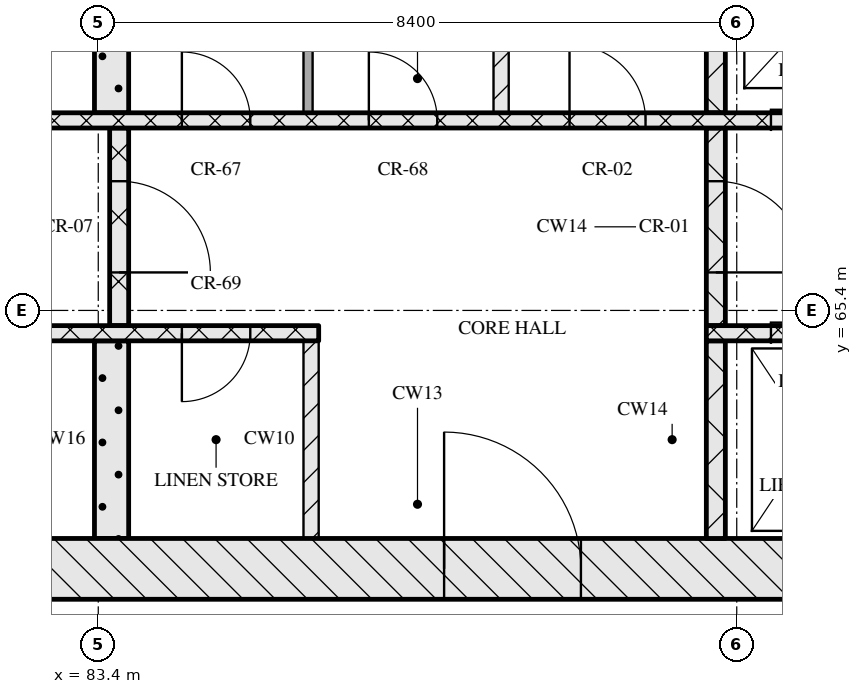
"""IFC4 building model, lengths in metres.
Left out: names, types, materials, properties, quantities, classifications, styles, units other than length and angle.
Written with IfcOpenShell. Run it as: python <this file> out.ifc"""

import sys

from ifc_helpers import new_model, si_unit, direction, frame, frame_2d, origin, place, context, subcontext, project, spatial, rectangle, extrude, element, fill, save


model = new_model("IFC4")
c1 = context("Model", 3, precision=1e-05, world=origin(), true_north=direction((0.0, 1.0)))
c2 = subcontext(c1, "Body", "Model", "MODEL_VIEW")
j1 = project(units=[si_unit("LENGTHUNIT", "METRE"), si_unit("PLANEANGLEUNIT", "RADIAN")], contexts=[c1])
p1 = place(None, origin())
s1 = spatial("IfcSite", under=j1, at=p1, CompositionType="ELEMENT")
p2 = place(p1, origin())
s2 = spatial("IfcBuilding", under=s1, at=p2, CompositionType="ELEMENT")
p3 = place(p2, frame((0.0, 0.0, 179.85)))
s3 = spatial("IfcBuildingStorey", under=s2, at=p3, CompositionType="ELEMENT", Elevation=179.85)
p4 = place(p3, frame((67.0, 62.0, 0.0), z_axis=(0.0, 0.0, 1.0), x_axis=(1.0, 0.0, 0.0)))
e1 = element("IfcWall", 1, at=p4, inside=s3, PredefinedType="SOLIDWALL", context=c2, shape_type="SweptSolid", body=[
    extrude(rectangle(XDim=41.2, YDim=0.8, at=frame_2d((20.6, 0.0))), origin(), (0.0, 0.0, 1.0), 3.32),
])
p5 = place(p4, frame((20.95, 0.0, 0.0)))
e2 = element("IfcOpeningElement", 2, at=p5, cuts=e1, PredefinedType="OPENING", context=c2, shape_type="SweptSolid", body=[
    extrude(rectangle(XDim=1.8, YDim=2.1, at=frame_2d((0.9, 1.05))), frame((0.0, 0.41, 0.0), z_axis=(0.0, -1.0, 0.0), x_axis=(1.0, 0.0, 0.0)), (0.0, 0.0, 1.0), 0.82),
])
p6 = place(p3, frame((83.575, 62.4, 0.0), z_axis=(0.0, 0.0, 1.0), x_axis=(0.0, 1.0, 0.0)))
e3 = element("IfcWall", 3, at=p6, inside=s3, PredefinedType="SOLIDWALL", context=c2, shape_type="SweptSolid", body=[
    extrude(rectangle(XDim=2.6, YDim=0.45, at=frame_2d((1.3, 0.0))), origin(), (0.0, 0.0, 1.0), 3.32),
])
p7 = place(p3, frame((86.2, 62.4, 0.0), z_axis=(0.0, 0.0, 1.0), x_axis=(0.0, 1.0, 0.0)))
e4 = element("IfcWall", 4, at=p7, inside=s3, PredefinedType="PARTITIONING", context=c2, shape_type="SweptSolid", body=[
    extrude(rectangle(XDim=2.6, YDim=0.2, at=frame_2d((1.3, 0.0))), origin(), (0.0, 0.0, 1.0), 3.32),
])
p8 = place(p3, frame((91.525, 62.4, 0.0), z_axis=(0.0, 0.0, 1.0), x_axis=(0.0, 1.0, 0.0)))
e5 = element("IfcWall", 5, at=p8, inside=s3, PredefinedType="SOLIDWALL", context=c2, shape_type="SweptSolid", body=[
    extrude(rectangle(XDim=2.6, YDim=0.25, at=frame_2d((1.3, 0.0))), origin(), (0.0, 0.0, 1.0), 3.32),
])
p9 = place(p3, frame((67.8, 65.1, 0.0), z_axis=(0.0, 0.0, 1.0), x_axis=(1.0, 0.0, 0.0)))
e6 = element("IfcWall", 6, at=p9, inside=s3, PredefinedType="SOLIDWALL", context=c2, shape_type="SweptSolid", body=[
    extrude(rectangle(XDim=18.5, YDim=0.2, at=frame_2d((9.25, 0.0))), origin(), (0.0, 0.0, 1.0), 3.32),
])
p10 = place(p9, frame((7.27, 0.0, 0.0)))
e7 = element("IfcOpeningElement", 7, at=p10, cuts=e6, PredefinedType="OPENING", context=c2, shape_type="SweptSolid", body=[
    extrude(rectangle(XDim=0.9, YDim=2.1, at=frame_2d((0.45, 1.05))), frame((0.0, 0.11, 0.0), z_axis=(0.0, -1.0, 0.0), x_axis=(1.0, 0.0, 0.0)), (0.0, 0.0, 1.0), 0.22),
])
p11 = place(p9, frame((9.65, 0.0, 0.0)))
e8 = element("IfcOpeningElement", 8, at=p11, cuts=e6, PredefinedType="OPENING", context=c2, shape_type="SweptSolid", body=[
    extrude(rectangle(XDim=0.9, YDim=2.1, at=frame_2d((0.45, 1.05))), frame((0.0, 0.11, 0.0), z_axis=(0.0, -1.0, 0.0), x_axis=(1.0, 0.0, 0.0)), (0.0, 0.0, 1.0), 0.22),
])
p12 = place(p9, frame((13.36, 0.0, 0.0)))
e9 = element("IfcOpeningElement", 9, at=p12, cuts=e6, PredefinedType="OPENING", context=c2, shape_type="SweptSolid", body=[
    extrude(rectangle(XDim=0.9, YDim=2.1, at=frame_2d((0.45, 1.05))), frame((0.0, 0.11, 0.0), z_axis=(0.0, -1.0, 0.0), x_axis=(1.0, 0.0, 0.0)), (0.0, 0.0, 1.0), 0.22),
])
p13 = place(p9, frame((16.7, 0.0, 0.0)))
e10 = element("IfcOpeningElement", 10, at=p13, cuts=e6, PredefinedType="OPENING", context=c2, shape_type="SweptSolid", body=[
    extrude(rectangle(XDim=0.9, YDim=2.1, at=frame_2d((0.45, 1.05))), frame((0.0, 0.11, 0.0), z_axis=(0.0, -1.0, 0.0), x_axis=(1.0, 0.0, 0.0)), (0.0, 0.0, 1.0), 0.22),
])
p14 = place(p3, frame((91.4, 65.1, 0.0), z_axis=(0.0, 0.0, 1.0), x_axis=(1.0, 0.0, 0.0)))
e11 = element("IfcWall", 11, at=p14, inside=s3, PredefinedType="SOLIDWALL", context=c2, shape_type="SweptSolid", body=[
    extrude(rectangle(XDim=16.0, YDim=0.2, at=frame_2d((8.0, 0.0))), origin(), (0.0, 0.0, 1.0), 3.32),
])
p15 = place(p14, frame((0.85, 0.0, 0.0)))
e12 = element("IfcOpeningElement", 12, at=p15, cuts=e11, PredefinedType="OPENING", context=c2, shape_type="SweptSolid", body=[
    extrude(rectangle(XDim=1.1, YDim=2.1, at=frame_2d((0.55, 1.05))), frame((0.0, 0.11, 0.0), z_axis=(0.0, -1.0, 0.0), x_axis=(1.0, 0.0, 0.0)), (0.0, 0.0, 1.0), 0.22),
])
p16 = place(p14, frame((3.35, 0.0, 0.0)))
e13 = element("IfcOpeningElement", 13, at=p16, cuts=e11, PredefinedType="OPENING", context=c2, shape_type="SweptSolid", body=[
    extrude(rectangle(XDim=1.1, YDim=2.1, at=frame_2d((0.55, 1.05))), frame((0.0, 0.11, 0.0), z_axis=(0.0, -1.0, 0.0), x_axis=(1.0, 0.0, 0.0)), (0.0, 0.0, 1.0), 0.22),
])
p17 = place(p14, frame((5.85, 0.0, 0.0)))
e14 = element("IfcOpeningElement", 14, at=p17, cuts=e11, PredefinedType="OPENING", context=c2, shape_type="SweptSolid", body=[
    extrude(rectangle(XDim=1.1, YDim=2.1, at=frame_2d((0.55, 1.05))), frame((0.0, 0.11, 0.0), z_axis=(0.0, -1.0, 0.0), x_axis=(1.0, 0.0, 0.0)), (0.0, 0.0, 1.0), 0.22),
])
p18 = place(p14, frame((7.83, 0.0, 0.0)))
e15 = element("IfcOpeningElement", 15, at=p18, cuts=e11, PredefinedType="OPENING", context=c2, shape_type="SweptSolid", body=[
    extrude(rectangle(XDim=0.9, YDim=2.1, at=frame_2d((0.45, 1.05))), frame((0.0, 0.11, 0.0), z_axis=(0.0, -1.0, 0.0), x_axis=(1.0, 0.0, 0.0)), (0.0, 0.0, 1.0), 0.22),
])
p19 = place(p3, frame((83.675, 65.2, 0.0), z_axis=(0.0, 0.0, 1.0), x_axis=(0.0, 1.0, 0.0)))
e16 = element("IfcWall", 16, at=p19, inside=s3, PredefinedType="SOLIDWALL", context=c2, shape_type="SweptSolid", body=[
    extrude(rectangle(XDim=2.6, YDim=0.25, at=frame_2d((1.3, 0.0))), origin(), (0.0, 0.0, 1.0), 3.32),
])
p20 = place(p19, frame((0.7, 0.0, 0.0)))
e17 = element("IfcOpeningElement", 17, at=p20, cuts=e16, PredefinedType="OPENING", context=c2, shape_type="SweptSolid", body=[
    extrude(rectangle(XDim=1.2, YDim=2.1, at=frame_2d((0.6, 1.05))), frame((0.0, 0.135, 0.0), z_axis=(0.0, -1.0, 0.0), x_axis=(1.0, 0.0, 0.0)), (0.0, 0.0, 1.0), 0.27),
])
p21 = place(p3, frame((91.525, 65.2, 0.0), z_axis=(0.0, 0.0, 1.0), x_axis=(0.0, 1.0, 0.0)))
e18 = element("IfcWall", 18, at=p21, inside=s3, PredefinedType="SOLIDWALL", context=c2, shape_type="SweptSolid", body=[
    extrude(rectangle(XDim=2.6, YDim=0.25, at=frame_2d((1.3, 0.0))), origin(), (0.0, 0.0, 1.0), 3.32),
])
p22 = place(p21, frame((0.7, 0.0, 0.0)))
e19 = element("IfcOpeningElement", 19, at=p22, cuts=e18, PredefinedType="OPENING", context=c2, shape_type="SweptSolid", body=[
    extrude(rectangle(XDim=1.2, YDim=2.1, at=frame_2d((0.6, 1.05))), frame((0.0, 0.135, 0.0), z_axis=(0.0, -1.0, 0.0), x_axis=(1.0, 0.0, 0.0)), (0.0, 0.0, 1.0), 0.27),
])
p23 = place(p3, frame((76.05, 67.9, 0.0), z_axis=(0.0, 0.0, 1.0), x_axis=(1.0, 0.0, 0.0)))
e20 = element("IfcWall", 20, at=p23, inside=s3, PredefinedType="SOLIDWALL", context=c2, shape_type="SweptSolid", body=[
    extrude(rectangle(XDim=23.1, YDim=0.2, at=frame_2d((11.55, 0.0))), origin(), (0.0, 0.0, 1.0), 3.32),
])
p24 = place(p23, frame((0.75, 0.0, 0.0)))
e21 = element("IfcOpeningElement", 21, at=p24, cuts=e20, PredefinedType="OPENING", context=c2, shape_type="SweptSolid", body=[
    extrude(rectangle(XDim=0.9, YDim=2.1, at=frame_2d((0.45, 1.05))), frame((0.0, 0.11, 0.0), z_axis=(0.0, -1.0, 0.0), x_axis=(1.0, 0.0, 0.0)), (0.0, 0.0, 1.0), 0.22),
])
p25 = place(p23, frame((3.32, 0.0, 0.0)))
e22 = element("IfcOpeningElement", 22, at=p25, cuts=e20, PredefinedType="OPENING", context=c2, shape_type="SweptSolid", body=[
    extrude(rectangle(XDim=0.9, YDim=2.1, at=frame_2d((0.45, 1.05))), frame((0.0, 0.11, 0.0), z_axis=(0.0, -1.0, 0.0), x_axis=(1.0, 0.0, 0.0)), (0.0, 0.0, 1.0), 0.22),
])
p26 = place(p23, frame((5.77, 0.0, 0.0)))
e23 = element("IfcOpeningElement", 23, at=p26, cuts=e20, PredefinedType="OPENING", context=c2, shape_type="SweptSolid", body=[
    extrude(rectangle(XDim=0.9, YDim=2.1, at=frame_2d((0.45, 1.05))), frame((0.0, 0.11, 0.0), z_axis=(0.0, -1.0, 0.0), x_axis=(1.0, 0.0, 0.0)), (0.0, 0.0, 1.0), 0.22),
])
p27 = place(p23, frame((8.45, 0.0, 0.0)))
e24 = element("IfcOpeningElement", 24, at=p27, cuts=e20, PredefinedType="OPENING", context=c2, shape_type="SweptSolid", body=[
    extrude(rectangle(XDim=0.9, YDim=2.1, at=frame_2d((0.45, 1.05))), frame((0.0, 0.11, 0.0), z_axis=(0.0, -1.0, 0.0), x_axis=(1.0, 0.0, 0.0)), (0.0, 0.0, 1.0), 0.22),
])
p28 = place(p23, frame((10.91, 0.0, 0.0)))
e25 = element("IfcOpeningElement", 25, at=p28, cuts=e20, PredefinedType="OPENING", context=c2, shape_type="SweptSolid", body=[
    extrude(rectangle(XDim=0.9, YDim=2.1, at=frame_2d((0.45, 1.05))), frame((0.0, 0.11, 0.0), z_axis=(0.0, -1.0, 0.0), x_axis=(1.0, 0.0, 0.0)), (0.0, 0.0, 1.0), 0.22),
])
p29 = place(p23, frame((13.55, 0.0, 0.0)))
e26 = element("IfcOpeningElement", 26, at=p29, cuts=e20, PredefinedType="OPENING", context=c2, shape_type="SweptSolid", body=[
    extrude(rectangle(XDim=1.0, YDim=2.1, at=frame_2d((0.5, 1.05))), frame((0.0, 0.11, 0.0), z_axis=(0.0, -1.0, 0.0), x_axis=(1.0, 0.0, 0.0)), (0.0, 0.0, 1.0), 0.22),
])
p30 = place(p23, frame((16.2, 0.0, 0.0)))
e27 = element("IfcOpeningElement", 27, at=p30, cuts=e20, PredefinedType="OPENING", context=c2, shape_type="SweptSolid", body=[
    extrude(rectangle(XDim=1.1, YDim=2.1, at=frame_2d((0.55, 1.05))), frame((0.0, 0.11, 0.0), z_axis=(0.0, -1.0, 0.0), x_axis=(1.0, 0.0, 0.0)), (0.0, 0.0, 1.0), 0.22),
])
p31 = place(p23, frame((18.7, 0.0, 0.0)))
e28 = element("IfcOpeningElement", 28, at=p31, cuts=e20, PredefinedType="OPENING", context=c2, shape_type="SweptSolid", body=[
    extrude(rectangle(XDim=1.1, YDim=2.1, at=frame_2d((0.55, 1.05))), frame((0.0, 0.11, 0.0), z_axis=(0.0, -1.0, 0.0), x_axis=(1.0, 0.0, 0.0)), (0.0, 0.0, 1.0), 0.22),
])
p32 = place(p23, frame((21.2, 0.0, 0.0)))
e29 = element("IfcOpeningElement", 29, at=p32, cuts=e20, PredefinedType="OPENING", context=c2, shape_type="SweptSolid", body=[
    extrude(rectangle(XDim=1.1, YDim=2.1, at=frame_2d((0.55, 1.05))), frame((0.0, 0.11, 0.0), z_axis=(0.0, -1.0, 0.0), x_axis=(1.0, 0.0, 0.0)), (0.0, 0.0, 1.0), 0.22),
])
p33 = place(p3, frame((83.575, 68.0, 0.0), z_axis=(0.0, 0.0, 1.0), x_axis=(0.0, 1.0, 0.0)))
e30 = element("IfcWall", 30, at=p33, inside=s3, PredefinedType="SOLIDWALL", context=c2, shape_type="SweptSolid", body=[
    extrude(rectangle(XDim=2.6, YDim=0.45, at=frame_2d((1.3, 0.0))), origin(), (0.0, 0.0, 1.0), 3.32),
])
p34 = place(p3, frame((86.16, 68.0, 0.0), z_axis=(0.0, 0.0, 1.0), x_axis=(0.0, 1.0, 0.0)))
e31 = element("IfcWall", 31, at=p34, inside=s3, PredefinedType="PARTITIONING", context=c2, shape_type="SweptSolid", body=[
    extrude(rectangle(XDim=2.6, YDim=0.12, at=frame_2d((1.3, 0.0))), origin(), (0.0, 0.0, 1.0), 3.32),
])
p35 = place(p3, frame((88.7, 68.0, 0.0), z_axis=(0.0, 0.0, 1.0), x_axis=(0.0, 1.0, 0.0)))
e32 = element("IfcWall", 32, at=p35, inside=s3, PredefinedType="PARTITIONING", context=c2, shape_type="SweptSolid", body=[
    extrude(rectangle(XDim=2.6, YDim=0.2, at=frame_2d((1.3, 0.0))), origin(), (0.0, 0.0, 1.0), 3.32),
])
p36 = place(p3, frame((91.525, 68.0, 0.0), z_axis=(0.0, 0.0, 1.0), x_axis=(0.0, 1.0, 0.0)))
e33 = element("IfcWall", 33, at=p36, inside=s3, PredefinedType="SOLIDWALL", context=c2, shape_type="SweptSolid", body=[
    extrude(rectangle(XDim=2.6, YDim=0.25, at=frame_2d((1.3, 0.0))), origin(), (0.0, 0.0, 1.0), 3.32),
])
p37 = place(p5, origin())
e34 = element("IfcDoor", 34, at=p37, inside=s3, OperationType="DOUBLE_DOOR_SINGLE_SWING", PredefinedType="DOOR", context=c2, shape_type="SweptSolid", body=[
    extrude(rectangle(XDim=1.8, YDim=2.1, at=frame_2d((0.9, 1.05))), frame((0.0, 0.025, 0.0), z_axis=(0.0, -1.0, 0.0), x_axis=(1.0, 0.0, 0.0)), (0.0, 0.0, 1.0), 0.05),
])
fill(e2, e34)
p38 = place(p13, origin())
e35 = element("IfcDoor", 35, at=p38, inside=s3, OperationType="SINGLE_SWING_RIGHT", PredefinedType="DOOR", context=c2, shape_type="SweptSolid", body=[
    extrude(rectangle(XDim=0.9, YDim=2.1, at=frame_2d((0.45, 1.05))), frame((0.0, 0.025, 0.0), z_axis=(0.0, -1.0, 0.0), x_axis=(1.0, 0.0, 0.0)), (0.0, 0.0, 1.0), 0.05),
])
fill(e10, e35)
p39 = place(p15, origin())
e36 = element("IfcDoor", 36, at=p39, inside=s3, OperationType="SLIDING_TO_LEFT", PredefinedType="DOOR", context=c2, shape_type="SweptSolid", body=[
    extrude(rectangle(XDim=1.1, YDim=2.1, at=frame_2d((0.55, 1.05))), frame((0.0, 0.025, 0.0), z_axis=(0.0, -1.0, 0.0), x_axis=(1.0, 0.0, 0.0)), (0.0, 0.0, 1.0), 0.05),
])
fill(e12, e36)
p40 = place(p20, origin())
e37 = element("IfcDoor", 37, at=p40, inside=s3, OperationType="SINGLE_SWING_RIGHT", PredefinedType="DOOR", context=c2, shape_type="SweptSolid", body=[
    extrude(rectangle(XDim=1.2, YDim=2.1, at=frame_2d((0.6, 1.05))), frame((0.0, 0.025, 0.0), z_axis=(0.0, -1.0, 0.0), x_axis=(1.0, 0.0, 0.0)), (0.0, 0.0, 1.0), 0.05),
])
fill(e17, e37)
p41 = place(p22, origin())
e38 = element("IfcDoor", 38, at=p41, inside=s3, OperationType="SINGLE_SWING_RIGHT", PredefinedType="DOOR", context=c2, shape_type="SweptSolid", body=[
    extrude(rectangle(XDim=1.2, YDim=2.1, at=frame_2d((0.6, 1.05))), frame((0.0, 0.025, 0.0), z_axis=(0.0, -1.0, 0.0), x_axis=(1.0, 0.0, 0.0)), (0.0, 0.0, 1.0), 0.05),
])
fill(e19, e38)
p42 = place(p27, origin())
e39 = element("IfcDoor", 39, at=p42, inside=s3, OperationType="SINGLE_SWING_LEFT", PredefinedType="DOOR", context=c2, shape_type="SweptSolid", body=[
    extrude(rectangle(XDim=0.9, YDim=2.1, at=frame_2d((0.45, 1.05))), frame((0.0, 0.025, 0.0), z_axis=(0.0, -1.0, 0.0), x_axis=(1.0, 0.0, 0.0)), (0.0, 0.0, 1.0), 0.05),
])
fill(e24, e39)
p43 = place(p28, origin())
e40 = element("IfcDoor", 40, at=p43, inside=s3, OperationType="SINGLE_SWING_LEFT", PredefinedType="DOOR", context=c2, shape_type="SweptSolid", body=[
    extrude(rectangle(XDim=0.9, YDim=2.1, at=frame_2d((0.45, 1.05))), frame((0.0, 0.025, 0.0), z_axis=(0.0, -1.0, 0.0), x_axis=(1.0, 0.0, 0.0)), (0.0, 0.0, 1.0), 0.05),
])
fill(e25, e40)
p44 = place(p29, origin())
e41 = element("IfcDoor", 41, at=p44, inside=s3, OperationType="SINGLE_SWING_LEFT", PredefinedType="DOOR", context=c2, shape_type="SweptSolid", body=[
    extrude(rectangle(XDim=1.0, YDim=2.1, at=frame_2d((0.5, 1.05))), frame((0.0, 0.025, 0.0), z_axis=(0.0, -1.0, 0.0), x_axis=(1.0, 0.0, 0.0)), (0.0, 0.0, 1.0), 0.05),
])
fill(e26, e41)
p45 = place(p30, origin())
e42 = element("IfcDoor", 42, at=p45, inside=s3, OperationType="SLIDING_TO_RIGHT", PredefinedType="DOOR", context=c2, shape_type="SweptSolid", body=[
    extrude(rectangle(XDim=1.1, YDim=2.1, at=frame_2d((0.55, 1.05))), frame((0.0, 0.025, 0.0), z_axis=(0.0, -1.0, 0.0), x_axis=(1.0, 0.0, 0.0)), (0.0, 0.0, 1.0), 0.05),
])
fill(e27, e42)
save(model, sys.argv[1])
